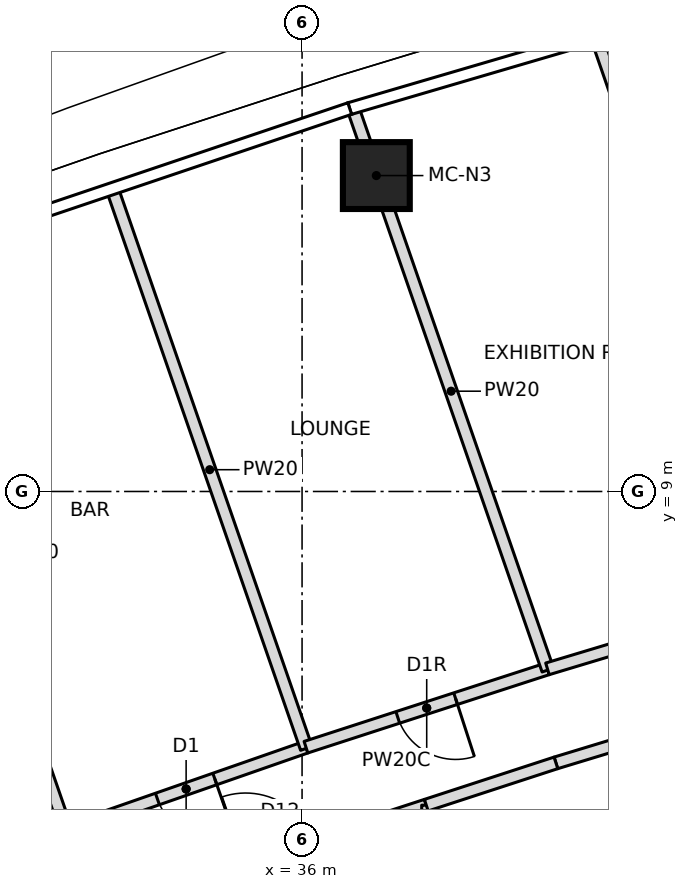
"""IFC4 building model, lengths in metres.
Left out: names, types, materials, properties, quantities, classifications, styles, units other than length and angle.
Written with IfcOpenShell. Run it as: python <this file> out.ifc"""

import sys

from ifc_helpers import new_model, si_unit, direction, frame, frame_2d, origin, origin_2d, place, context, subcontext, project, spatial, rectangle, extrude, element, fill, save


model = new_model("IFC4")
c1 = context("Model", 3, precision=1e-05, world=origin(), true_north=direction((0.0, 1.0)))
c2 = subcontext(c1, "Body", "Model", "MODEL_VIEW")
j1 = project(units=[si_unit("LENGTHUNIT", "METRE"), si_unit("PLANEANGLEUNIT", "RADIAN")], contexts=[c1])
p1 = place(None, origin())
s1 = spatial("IfcSite", under=j1, at=p1, CompositionType="ELEMENT")
p2 = place(p1, origin())
s2 = spatial("IfcBuilding", under=s1, at=p2, CompositionType="ELEMENT")
p3 = place(p2, frame((0.0, 0.0, 263.3)))
s3 = spatial("IfcBuildingStorey", under=s2, at=p3, CompositionType="ELEMENT", Elevation=263.3)
p4 = place(p3, frame((37.221, 14.196, 0.0), z_axis=(0.0, 0.0, 1.0), x_axis=(1.0, 0.0, 0.0)))
e1 = element("IfcColumn", 1, at=p4, inside=s3, PredefinedType="COLUMN", context=c2, shape_type="SweptSolid", body=[
    extrude(rectangle(XDim=1.1, YDim=1.1, at=origin_2d()), origin(), (0.0, 0.0, 1.0), 4.6),
])
p5 = place(p3, frame((32.129, 3.401, 0.0), z_axis=(0.0, 0.0, 1.0), x_axis=(-0.327724115377, 0.944773467134, 0.0)))
e2 = element("IfcWall", 2, at=p5, inside=s3, PredefinedType="PARTITIONING", context=c2, shape_type="SweptSolid", body=[
    extrude(rectangle(XDim=9.702, YDim=0.2, at=frame_2d((4.851, 0.0))), origin(), (0.0, 0.0, 1.0), 4.3),
])
p6 = place(p3, frame((36.064, 4.794, 0.0), z_axis=(0.0, 0.0, 1.0), x_axis=(-0.944236129554, -0.329269086986, 0.0)))
e3 = element("IfcWall", 3, at=p6, inside=s3, PredefinedType="PARTITIONING", context=c2, shape_type="SweptSolid", body=[
    extrude(rectangle(XDim=4.174, YDim=0.2, at=frame_2d((2.087, 0.0))), origin(), (0.0, 0.0, 1.0), 4.3),
])
p7 = place(p6, frame((1.587, 0.0, 0.0)))
e4 = element("IfcOpeningElement", 4, at=p7, cuts=e3, PredefinedType="OPENING", context=c2, shape_type="SweptSolid", body=[
    extrude(rectangle(XDim=1.0, YDim=2.1, at=frame_2d((0.5, 1.05))), frame((0.0, 0.11, 0.0), z_axis=(0.0, -1.0, 0.0), x_axis=(1.0, 0.0, 0.0)), (0.0, 0.0, 1.0), 0.22),
])
p8 = place(p3, frame((36.071, 4.775, 0.0), z_axis=(0.0, 0.0, 1.0), x_axis=(-0.327725028322, 0.94477315045, 0.0)))
e5 = element("IfcWall", 5, at=p8, inside=s3, PredefinedType="PARTITIONING", context=c2, shape_type="SweptSolid", body=[
    extrude(rectangle(XDim=9.702, YDim=0.2, at=frame_2d((4.851, 0.0))), origin(), (0.0, 0.0, 1.0), 4.3),
])
p9 = place(p3, frame((40.035, 6.083, 0.0), z_axis=(0.0, 0.0, 1.0), x_axis=(-0.951196378796, -0.308586209941, 0.0)))
e6 = element("IfcWall", 6, at=p9, inside=s3, PredefinedType="PARTITIONING", context=c2, shape_type="SweptSolid", body=[
    extrude(rectangle(XDim=4.175, YDim=0.2, at=frame_2d((2.087, 0.0))), origin(), (0.0, 0.0, 1.0), 4.3),
])
p10 = place(p9, frame((1.588, 0.0, 0.0)))
e7 = element("IfcOpeningElement", 7, at=p10, cuts=e6, PredefinedType="OPENING", context=c2, shape_type="SweptSolid", body=[
    extrude(rectangle(XDim=1.0, YDim=2.1, at=frame_2d((0.5, 1.05))), frame((0.0, 0.11, 0.0), z_axis=(0.0, -1.0, 0.0), x_axis=(1.0, 0.0, 0.0)), (0.0, 0.0, 1.0), 0.22),
])
p11 = place(p3, frame((40.042, 6.064, 0.0), z_axis=(0.0, 0.0, 1.0), x_axis=(-0.327710853631, 0.944778067279, 0.0)))
e8 = element("IfcWall", 8, at=p11, inside=s3, PredefinedType="PARTITIONING", context=c2, shape_type="SweptSolid", body=[
    extrude(rectangle(XDim=9.707, YDim=0.2, at=frame_2d((4.854, 0.0))), origin(), (0.0, 0.0, 1.0), 4.3),
])
p12 = place(p3, frame((44.031, 7.286, 0.0), z_axis=(0.0, 0.0, 1.0), x_axis=(-0.957521424208, -0.288362137222, 0.0)))
e9 = element("IfcWall", 9, at=p12, inside=s3, PredefinedType="PARTITIONING", context=c2, shape_type="SweptSolid", body=[
    extrude(rectangle(XDim=4.173, YDim=0.2, at=frame_2d((2.086, 0.0))), origin(), (0.0, 0.0, 1.0), 4.3),
])
p13 = place(p12, frame((1.586, 0.0, 0.0)))
e10 = element("IfcOpeningElement", 10, at=p13, cuts=e9, PredefinedType="OPENING", context=c2, shape_type="SweptSolid", body=[
    extrude(rectangle(XDim=1.0, YDim=2.1, at=frame_2d((0.5, 1.05))), frame((0.0, 0.11, 0.0), z_axis=(0.0, -1.0, 0.0), x_axis=(1.0, 0.0, 0.0)), (0.0, 0.0, 1.0), 0.22),
])
p14 = place(p3, frame((44.038, 7.267, 0.0), z_axis=(0.0, 0.0, 1.0), x_axis=(-0.327714576096, 0.944776776077, 0.0)))
e11 = element("IfcWall", 11, at=p14, inside=s3, PredefinedType="PARTITIONING", context=c2, shape_type="SweptSolid", body=[
    extrude(rectangle(XDim=9.717, YDim=0.2, at=frame_2d((4.858, 0.0))), origin(), (0.0, 0.0, 1.0), 4.3),
])
p15 = place(p3, frame((36.455, 3.323, 0.0), z_axis=(0.0, 0.0, 1.0), x_axis=(0.950695184954, 0.31012685357, 0.0)))
e12 = element("IfcWall", 12, at=p15, inside=s3, PredefinedType="PARTITIONING", context=c2, shape_type="SweptSolid", body=[
    extrude(rectangle(XDim=1.67, YDim=0.2, at=frame_2d((0.835, 0.0))), origin(), (0.0, 0.0, 1.0), 4.3),
])
p16 = place(p3, frame((38.043, -3.841, 0.0), z_axis=(0.0, 0.0, 1.0), x_axis=(0.0, 1.0, 0.0)))
e13 = element("IfcWall", 13, at=p16, inside=s3, PredefinedType="PARTITIONING", context=c2, shape_type="SweptSolid", body=[
    extrude(rectangle(XDim=7.682, YDim=0.15, at=frame_2d((3.841, 0.0))), origin(), (0.0, 0.0, 1.0), 4.3),
])
p17 = place(p3, frame((40.175, 4.536, 0.0), z_axis=(0.0, 0.0, 1.0), x_axis=(0.956723737069, 0.29099775073, 0.0)))
e14 = element("IfcWall", 14, at=p17, inside=s3, PredefinedType="PARTITIONING", context=c2, shape_type="SweptSolid", body=[
    extrude(rectangle(XDim=3.913, YDim=0.2, at=frame_2d((1.957, 0.0))), origin(), (0.0, 0.0, 1.0), 4.3),
])
p18 = place(p17, frame((1.457, 0.0, 0.0)))
e15 = element("IfcOpeningElement", 15, at=p18, cuts=e14, PredefinedType="OPENING", context=c2, shape_type="SweptSolid", body=[
    extrude(rectangle(XDim=1.0, YDim=2.1, at=frame_2d((0.5, 1.05))), frame((0.0, 0.11, 0.0), z_axis=(0.0, -1.0, 0.0), x_axis=(1.0, 0.0, 0.0)), (0.0, 0.0, 1.0), 0.22),
])
p19 = place(p3, frame((38.043, 3.841, 0.0), z_axis=(0.0, 0.0, 1.0), x_axis=(0.950720770841, 0.310048408949, 0.0)))
e16 = element("IfcWall", 16, at=p19, inside=s3, PredefinedType="PARTITIONING", context=c2, shape_type="SweptSolid", body=[
    extrude(rectangle(XDim=2.243, YDim=0.2, at=frame_2d((1.121, 0.0))), origin(), (0.0, 0.0, 1.0), 4.3),
])
p20 = place(p7, origin())
e17 = element("IfcDoor", 17, at=p20, inside=s3, OperationType="SINGLE_SWING_LEFT", PredefinedType="DOOR", context=c2, shape_type="SweptSolid", body=[
    extrude(rectangle(XDim=1.0, YDim=2.1, at=frame_2d((0.5, 1.05))), frame((0.0, 0.025, 0.0), z_axis=(0.0, -1.0, 0.0), x_axis=(1.0, 0.0, 0.0)), (0.0, 0.0, 1.0), 0.05),
])
fill(e4, e17)
p21 = place(p10, origin())
e18 = element("IfcDoor", 18, at=p21, inside=s3, OperationType="SINGLE_SWING_RIGHT", PredefinedType="DOOR", context=c2, shape_type="SweptSolid", body=[
    extrude(rectangle(XDim=1.0, YDim=2.1, at=frame_2d((0.5, 1.05))), frame((0.0, 0.025, 0.0), z_axis=(0.0, -1.0, 0.0), x_axis=(1.0, 0.0, 0.0)), (0.0, 0.0, 1.0), 0.05),
])
fill(e7, e18)
save(model, sys.argv[1])
